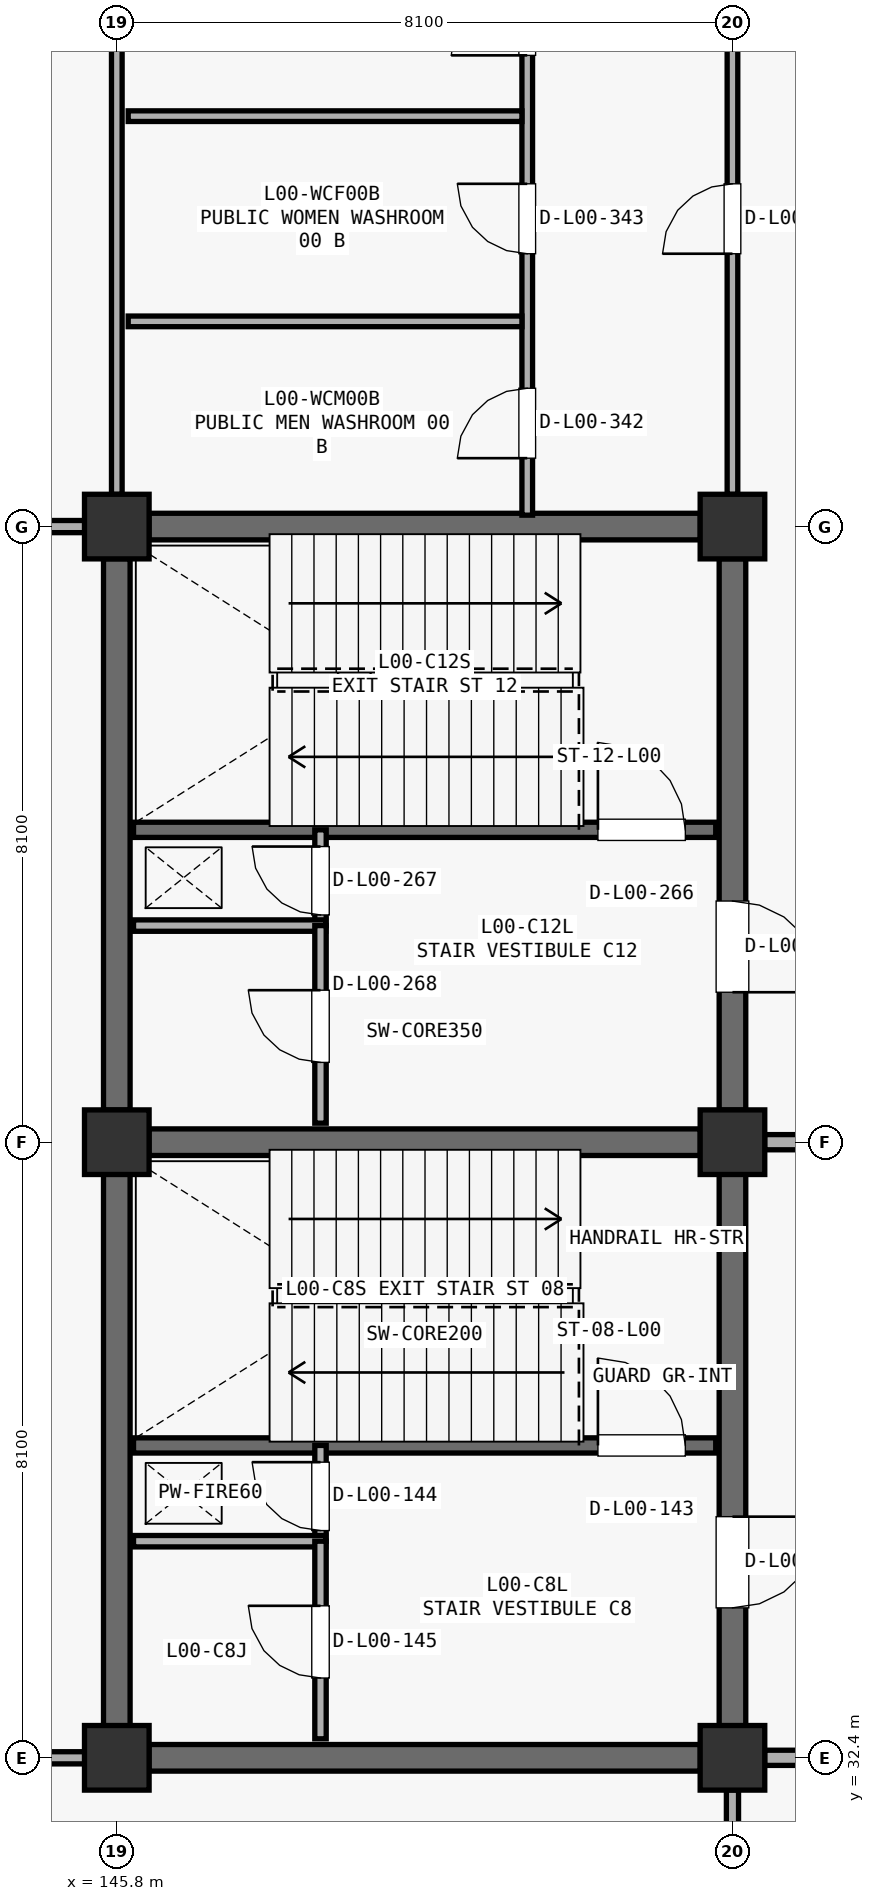
"""IFC4 building model, lengths in metres.
Left out: names, types, materials, properties, quantities, classifications, styles, units other than length and angle.
Written with IfcOpenShell. Run it as: python <this file> out.ifc"""

import sys

from ifc_helpers import new_model, si_unit, direction, frame, frame_2d, origin, origin_2d, place, context, subcontext, project, spatial, rectangle, extrude, element, fill, save


model = new_model("IFC4")
c1 = context("Model", 3, precision=1e-05, world=origin(), true_north=direction((0.0, 1.0)))
c2 = subcontext(c1, "Body", "Model", "MODEL_VIEW")
j1 = project(units=[si_unit("LENGTHUNIT", "METRE"), si_unit("PLANEANGLEUNIT", "RADIAN")], contexts=[c1])
p1 = place(None, origin())
s1 = spatial("IfcSite", under=j1, at=p1, CompositionType="ELEMENT")
p2 = place(p1, origin())
s2 = spatial("IfcBuilding", under=s1, at=p2, CompositionType="ELEMENT")
p3 = place(p2, origin())
s3 = spatial("IfcBuildingStorey", under=s2, at=p3, CompositionType="ELEMENT", Elevation=0.0)
for number, where, z_axis, x_axis in (
    (1, (145.8, 32.4, 0.0), (0.0, 0.0, 1.0), (1.0, 0.0, 0.0)),
    (2, (145.8, 40.5, 0.0), (0.0, 0.0, 1.0), (1.0, 0.0, 0.0)),
    (3, (145.8, 48.6, 0.0), (0.0, 0.0, 1.0), (1.0, 0.0, 0.0)),
    (4, (153.9, 32.4, 0.0), (0.0, 0.0, 1.0), (1.0, 0.0, 0.0)),
    (5, (153.9, 40.5, 0.0), (0.0, 0.0, 1.0), (1.0, 0.0, 0.0)),
    (6, (153.9, 48.6, 0.0), (0.0, 0.0, 1.0), (1.0, 0.0, 0.0)),
):
    element("IfcColumn", number, at=place(p3, frame(where, z_axis=z_axis, x_axis=x_axis)), inside=s3, PredefinedType="COLUMN", context=c2, shape_type="SweptSolid", body=[
        extrude(rectangle(XDim=0.85, YDim=0.85, at=origin_2d()), origin(), (0.0, 0.0, 1.0), 5.1),
    ])
p4 = place(p3, frame((146.223, 40.5, 0.0), z_axis=(0.0, 0.0, 1.0), x_axis=(1.0, 0.0, 0.0)))
e7 = element("IfcWall", 7, at=p4, inside=s3, PredefinedType="SHEAR", context=c2, shape_type="SweptSolid", body=[
    extrude(rectangle(XDim=7.254, YDim=0.35, at=frame_2d((3.627, 0.0))), origin(), (0.0, 0.0, 1.0), 4.822),
])
p5 = place(p3, frame((145.8, 32.823, 0.0), z_axis=(0.0, 0.0, 1.0), x_axis=(0.0, 1.0, 0.0)))
e8 = element("IfcWall", 8, at=p5, inside=s3, PredefinedType="SHEAR", context=c2, shape_type="SweptSolid", body=[
    extrude(rectangle(XDim=7.254, YDim=0.35, at=frame_2d((3.627, 0.0))), origin(), (0.0, 0.0, 1.0), 4.822),
])
p6 = place(p3, frame((153.9, 32.823, 0.0), z_axis=(0.0, 0.0, 1.0), x_axis=(0.0, 1.0, 0.0)))
e9 = element("IfcWall", 9, at=p6, inside=s3, PredefinedType="SHEAR", context=c2, shape_type="SweptSolid", body=[
    extrude(rectangle(XDim=7.254, YDim=0.35, at=frame_2d((3.627, 0.0))), origin(), (0.0, 0.0, 1.0), 4.822),
])
p7 = place(p6, frame((2.75, 0.0, 0.0), z_axis=(0.0, 0.0, 1.0), x_axis=(-1.0, 0.0, 0.0)))
e10 = element("IfcOpeningElement", 10, at=p7, cuts=e9, PredefinedType="OPENING", context=c2, shape_type="SweptSolid", body=[
    extrude(rectangle(XDim=1.2, YDim=2.2, at=frame_2d((0.6, 1.1))), frame((0.0, 0.185, 0.0), z_axis=(0.0, -1.0, 0.0), x_axis=(1.0, 0.0, 0.0)), (0.0, 0.0, 1.0), 0.37),
])
p8 = place(p3, frame((146.223, 32.4, 0.0), z_axis=(0.0, 0.0, 1.0), x_axis=(1.0, 0.0, 0.0)))
e11 = element("IfcWall", 11, at=p8, inside=s3, PredefinedType="SHEAR", context=c2, shape_type="SweptSolid", body=[
    extrude(rectangle(XDim=7.254, YDim=0.35, at=frame_2d((3.627, 0.0))), origin(), (0.0, 0.0, 1.0), 4.822),
])
p9 = place(p3, frame((146.02, 36.51, 0.0), z_axis=(0.0, 0.0, 1.0), x_axis=(1.0, 0.0, 0.0)))
e12 = element("IfcWall", 12, at=p9, inside=s3, PredefinedType="SHEAR", context=c2, shape_type="SweptSolid", body=[
    extrude(rectangle(XDim=7.66, YDim=0.2, at=frame_2d((3.83, 0.0))), origin(), (0.0, 0.0, 1.0), 4.822),
])
p10 = place(p9, frame((6.11, 0.0, 0.0)))
e13 = element("IfcOpeningElement", 13, at=p10, cuts=e12, PredefinedType="OPENING", context=c2, shape_type="SweptSolid", body=[
    extrude(rectangle(XDim=1.15, YDim=2.2, at=frame_2d((0.575, 1.1))), frame((0.0, 0.11, 0.0), z_axis=(0.0, -1.0, 0.0), x_axis=(1.0, 0.0, 0.0)), (0.0, 0.0, 1.0), 0.22),
])
p11 = place(p3, frame((148.48, 35.25, 0.0), z_axis=(0.0, 0.0, 1.0), x_axis=(0.0, 1.0, 0.0)))
e14 = element("IfcWall", 14, at=p11, inside=s3, PredefinedType="PARTITIONING", context=c2, shape_type="SweptSolid", body=[
    extrude(rectangle(XDim=1.26, YDim=0.15, at=frame_2d((0.63, 0.0))), origin(), (0.0, 0.0, 1.0), 4.822),
])
p12 = place(p11, frame((0.14, 0.0, 0.0)))
e15 = element("IfcOpeningElement", 15, at=p12, cuts=e14, PredefinedType="OPENING", context=c2, shape_type="SweptSolid", body=[
    extrude(rectangle(XDim=0.9, YDim=2.15, at=frame_2d((0.45, 1.075))), frame((0.0, 0.085, 0.0), z_axis=(0.0, -1.0, 0.0), x_axis=(1.0, 0.0, 0.0)), (0.0, 0.0, 1.0), 0.17),
])
p13 = place(p3, frame((146.02, 35.25, 0.0), z_axis=(0.0, 0.0, 1.0), x_axis=(1.0, 0.0, 0.0)))
e16 = element("IfcWall", 16, at=p13, inside=s3, PredefinedType="PARTITIONING", context=c2, shape_type="SweptSolid", body=[
    extrude(rectangle(XDim=2.53, YDim=0.15, at=frame_2d((1.265, 0.0))), origin(), (0.0, 0.0, 1.0), 4.822),
])
p14 = place(p3, frame((148.48, 32.65, 0.0), z_axis=(0.0, 0.0, 1.0), x_axis=(0.0, 1.0, 0.0)))
e17 = element("IfcWall", 17, at=p14, inside=s3, PredefinedType="PARTITIONING", context=c2, shape_type="SweptSolid", body=[
    extrude(rectangle(XDim=2.6, YDim=0.15, at=frame_2d((1.3, 0.0))), origin(), (0.0, 0.0, 1.0), 4.822),
])
p15 = place(p14, frame((0.8, 0.0, 0.0)))
e18 = element("IfcOpeningElement", 18, at=p15, cuts=e17, PredefinedType="OPENING", context=c2, shape_type="SweptSolid", body=[
    extrude(rectangle(XDim=0.95, YDim=2.15, at=frame_2d((0.475, 1.075))), frame((0.0, 0.085, 0.0), z_axis=(0.0, -1.0, 0.0), x_axis=(1.0, 0.0, 0.0)), (0.0, 0.0, 1.0), 0.17),
])
p16 = place(p3, frame((146.223, 48.6, 0.0), z_axis=(0.0, 0.0, 1.0), x_axis=(1.0, 0.0, 0.0)))
e19 = element("IfcWall", 19, at=p16, inside=s3, PredefinedType="SHEAR", context=c2, shape_type="SweptSolid", body=[
    extrude(rectangle(XDim=7.254, YDim=0.35, at=frame_2d((3.627, 0.0))), origin(), (0.0, 0.0, 1.0), 4.822),
])
p17 = place(p3, frame((145.8, 40.923, 0.0), z_axis=(0.0, 0.0, 1.0), x_axis=(0.0, 1.0, 0.0)))
e20 = element("IfcWall", 20, at=p17, inside=s3, PredefinedType="SHEAR", context=c2, shape_type="SweptSolid", body=[
    extrude(rectangle(XDim=7.254, YDim=0.35, at=frame_2d((3.627, 0.0))), origin(), (0.0, 0.0, 1.0), 4.822),
])
p18 = place(p3, frame((153.9, 40.923, 0.0), z_axis=(0.0, 0.0, 1.0), x_axis=(0.0, 1.0, 0.0)))
e21 = element("IfcWall", 21, at=p18, inside=s3, PredefinedType="SHEAR", context=c2, shape_type="SweptSolid", body=[
    extrude(rectangle(XDim=7.254, YDim=0.35, at=frame_2d((3.627, 0.0))), origin(), (0.0, 0.0, 1.0), 4.822),
])
p19 = place(p18, frame((2.75, 0.0, 0.0), z_axis=(0.0, 0.0, 1.0), x_axis=(-1.0, 0.0, 0.0)))
e22 = element("IfcOpeningElement", 22, at=p19, cuts=e21, PredefinedType="OPENING", context=c2, shape_type="SweptSolid", body=[
    extrude(rectangle(XDim=1.2, YDim=2.2, at=frame_2d((0.6, 1.1))), frame((0.0, 0.185, 0.0), z_axis=(0.0, -1.0, 0.0), x_axis=(1.0, 0.0, 0.0)), (0.0, 0.0, 1.0), 0.37),
])
p20 = place(p3, frame((146.02, 44.61, 0.0), z_axis=(0.0, 0.0, 1.0), x_axis=(1.0, 0.0, 0.0)))
e23 = element("IfcWall", 23, at=p20, inside=s3, PredefinedType="SHEAR", context=c2, shape_type="SweptSolid", body=[
    extrude(rectangle(XDim=7.66, YDim=0.2, at=frame_2d((3.83, 0.0))), origin(), (0.0, 0.0, 1.0), 4.822),
])
p21 = place(p20, frame((6.11, 0.0, 0.0)))
e24 = element("IfcOpeningElement", 24, at=p21, cuts=e23, PredefinedType="OPENING", context=c2, shape_type="SweptSolid", body=[
    extrude(rectangle(XDim=1.15, YDim=2.2, at=frame_2d((0.575, 1.1))), frame((0.0, 0.11, 0.0), z_axis=(0.0, -1.0, 0.0), x_axis=(1.0, 0.0, 0.0)), (0.0, 0.0, 1.0), 0.22),
])
p22 = place(p3, frame((148.48, 43.35, 0.0), z_axis=(0.0, 0.0, 1.0), x_axis=(0.0, 1.0, 0.0)))
e25 = element("IfcWall", 25, at=p22, inside=s3, PredefinedType="PARTITIONING", context=c2, shape_type="SweptSolid", body=[
    extrude(rectangle(XDim=1.26, YDim=0.15, at=frame_2d((0.63, 0.0))), origin(), (0.0, 0.0, 1.0), 4.822),
])
p23 = place(p22, frame((0.14, 0.0, 0.0)))
e26 = element("IfcOpeningElement", 26, at=p23, cuts=e25, PredefinedType="OPENING", context=c2, shape_type="SweptSolid", body=[
    extrude(rectangle(XDim=0.9, YDim=2.15, at=frame_2d((0.45, 1.075))), frame((0.0, 0.085, 0.0), z_axis=(0.0, -1.0, 0.0), x_axis=(1.0, 0.0, 0.0)), (0.0, 0.0, 1.0), 0.17),
])
p24 = place(p3, frame((146.02, 43.35, 0.0), z_axis=(0.0, 0.0, 1.0), x_axis=(1.0, 0.0, 0.0)))
e27 = element("IfcWall", 27, at=p24, inside=s3, PredefinedType="PARTITIONING", context=c2, shape_type="SweptSolid", body=[
    extrude(rectangle(XDim=2.53, YDim=0.15, at=frame_2d((1.265, 0.0))), origin(), (0.0, 0.0, 1.0), 4.822),
])
p25 = place(p3, frame((148.48, 40.75, 0.0), z_axis=(0.0, 0.0, 1.0), x_axis=(0.0, 1.0, 0.0)))
e28 = element("IfcWall", 28, at=p25, inside=s3, PredefinedType="PARTITIONING", context=c2, shape_type="SweptSolid", body=[
    extrude(rectangle(XDim=2.6, YDim=0.15, at=frame_2d((1.3, 0.0))), origin(), (0.0, 0.0, 1.0), 4.822),
])
p26 = place(p25, frame((0.8, 0.0, 0.0)))
e29 = element("IfcOpeningElement", 29, at=p26, cuts=e28, PredefinedType="OPENING", context=c2, shape_type="SweptSolid", body=[
    extrude(rectangle(XDim=0.95, YDim=2.15, at=frame_2d((0.475, 1.075))), frame((0.0, 0.085, 0.0), z_axis=(0.0, -1.0, 0.0), x_axis=(1.0, 0.0, 0.0)), (0.0, 0.0, 1.0), 0.17),
])
p27 = place(p3, frame((145.8, 49.023, 0.0), z_axis=(0.0, 0.0, 1.0), x_axis=(0.0, 1.0, 0.0)))
e30 = element("IfcWall", 30, at=p27, inside=s3, PredefinedType="PARTITIONING", context=c2, shape_type="SweptSolid", body=[
    extrude(rectangle(XDim=7.254, YDim=0.14, at=frame_2d((3.627, 0.0))), origin(), (0.0, 0.0, 1.0), 3.97),
])
p28 = place(p3, frame((153.9, 49.023, 0.0), z_axis=(0.0, 0.0, 1.0), x_axis=(0.0, 1.0, 0.0)))
e31 = element("IfcWall", 31, at=p28, inside=s3, PredefinedType="PARTITIONING", context=c2, shape_type="SweptSolid", body=[
    extrude(rectangle(XDim=7.254, YDim=0.14, at=frame_2d((3.627, 0.0))), origin(), (0.0, 0.0, 1.0), 4.07),
])
p29 = place(p28, frame((3.167, 0.0, 0.0)))
e32 = element("IfcOpeningElement", 32, at=p29, cuts=e31, PredefinedType="OPENING", context=c2, shape_type="SweptSolid", body=[
    extrude(rectangle(XDim=0.92, YDim=2.15, at=frame_2d((0.46, 1.075))), frame((0.0, 0.08, 0.0), z_axis=(0.0, -1.0, 0.0), x_axis=(1.0, 0.0, 0.0)), (0.0, 0.0, 1.0), 0.16),
])
p30 = place(p3, frame((151.2, 48.75, 0.0), z_axis=(0.0, 0.0, 1.0), x_axis=(0.0, 1.0, 0.0)))
e33 = element("IfcWall", 33, at=p30, inside=s3, PredefinedType="PARTITIONING", context=c2, shape_type="SweptSolid", body=[
    extrude(rectangle(XDim=7.8, YDim=0.14, at=frame_2d((3.9, 0.0))), origin(), (0.0, 0.0, 1.0), 4.822),
])
p31 = place(p30, frame((0.75, 0.0, 0.0)))
e34 = element("IfcOpeningElement", 34, at=p31, cuts=e33, PredefinedType="OPENING", context=c2, shape_type="SweptSolid", body=[
    extrude(rectangle(XDim=0.92, YDim=2.15, at=frame_2d((0.46, 1.075))), frame((0.0, 0.08, 0.0), z_axis=(0.0, -1.0, 0.0), x_axis=(1.0, 0.0, 0.0)), (0.0, 0.0, 1.0), 0.16),
])
p32 = place(p30, frame((3.44, 0.0, 0.0)))
e35 = element("IfcOpeningElement", 35, at=p32, cuts=e33, PredefinedType="OPENING", context=c2, shape_type="SweptSolid", body=[
    extrude(rectangle(XDim=0.92, YDim=2.15, at=frame_2d((0.46, 1.075))), frame((0.0, 0.08, 0.0), z_axis=(0.0, -1.0, 0.0), x_axis=(1.0, 0.0, 0.0)), (0.0, 0.0, 1.0), 0.16),
])
p33 = place(p30, frame((6.05, 0.0, 0.0)))
e36 = element("IfcOpeningElement", 36, at=p33, cuts=e33, PredefinedType="OPENING", context=c2, shape_type="SweptSolid", body=[
    extrude(rectangle(XDim=1.0, YDim=2.15, at=frame_2d((0.5, 1.075))), frame((0.0, 0.08, 0.0), z_axis=(0.0, -1.0, 0.0), x_axis=(1.0, 0.0, 0.0)), (0.0, 0.0, 1.0), 0.16),
])
for number, where, z_axis, x_axis in (
    (37, (145.95, 51.3, 0.0), (0.0, 0.0, 1.0), (1.0, 0.0, 0.0)),
    (38, (145.95, 54.0, 0.0), (0.0, 0.0, 1.0), (1.0, 0.0, 0.0)),
):
    element("IfcWall", number, at=place(p3, frame(where, z_axis=z_axis, x_axis=x_axis)), inside=s3, PredefinedType="PARTITIONING", context=c2, shape_type="SweptSolid", body=[
        extrude(rectangle(XDim=5.18, YDim=0.14, at=frame_2d((2.59, 0.0))), origin(), (0.0, 0.0, 1.0), 4.822),
    ])
p34 = place(p3, frame((153.9, 24.723, 0.0), z_axis=(0.0, 0.0, 1.0), x_axis=(0.0, 1.0, 0.0)))
e39 = element("IfcWall", 39, at=p34, inside=s3, PredefinedType="PARTITIONING", context=c2, shape_type="SweptSolid", body=[
    extrude(rectangle(XDim=7.254, YDim=0.16, at=frame_2d((3.627, 0.0))), origin(), (0.0, 0.0, 1.0), 4.222),
])
p35 = place(p3, frame((138.123, 32.4, 0.0), z_axis=(0.0, 0.0, 1.0), x_axis=(1.0, 0.0, 0.0)))
e40 = element("IfcWall", 40, at=p35, inside=s3, PredefinedType="PARTITIONING", context=c2, shape_type="SweptSolid", body=[
    extrude(rectangle(XDim=7.254, YDim=0.16, at=frame_2d((3.627, 0.0))), origin(), (0.0, 0.0, 1.0), 4.222),
])
p36 = place(p3, frame((138.123, 48.6, 0.0), z_axis=(0.0, 0.0, 1.0), x_axis=(1.0, 0.0, 0.0)))
e41 = element("IfcWall", 41, at=p36, inside=s3, PredefinedType="PARTITIONING", context=c2, shape_type="SweptSolid", body=[
    extrude(rectangle(XDim=7.254, YDim=0.16, at=frame_2d((3.627, 0.0))), origin(), (0.0, 0.0, 1.0), 3.872),
])
p37 = place(p3, frame((154.323, 32.4, 0.0), z_axis=(0.0, 0.0, 1.0), x_axis=(1.0, 0.0, 0.0)))
e42 = element("IfcWall", 42, at=p37, inside=s3, PredefinedType="PARTITIONING", context=c2, shape_type="SweptSolid", body=[
    extrude(rectangle(XDim=7.254, YDim=0.2, at=frame_2d((3.627, 0.0))), origin(), (0.0, 0.0, 1.0), 3.872),
])
p38 = place(p37, frame((2.727, 0.0, 0.0)))
e43 = element("IfcOpeningElement", 43, at=p38, cuts=e42, PredefinedType="OPENING", context=c2, shape_type="SweptSolid", body=[
    extrude(rectangle(XDim=1.8, YDim=2.2, at=frame_2d((0.9, 1.1))), frame((0.0, 0.11, 0.0), z_axis=(0.0, -1.0, 0.0), x_axis=(1.0, 0.0, 0.0)), (0.0, 0.0, 1.0), 0.22),
])
p39 = place(p3, frame((154.323, 40.5, 0.0), z_axis=(0.0, 0.0, 1.0), x_axis=(1.0, 0.0, 0.0)))
e44 = element("IfcWall", 44, at=p39, inside=s3, PredefinedType="PARTITIONING", context=c2, shape_type="SweptSolid", body=[
    extrude(rectangle(XDim=7.254, YDim=0.2, at=frame_2d((3.627, 0.0))), origin(), (0.0, 0.0, 1.0), 4.072),
])
p40 = place(p39, frame((2.727, 0.0, 0.0)))
e45 = element("IfcOpeningElement", 45, at=p40, cuts=e44, PredefinedType="OPENING", context=c2, shape_type="SweptSolid", body=[
    extrude(rectangle(XDim=1.8, YDim=2.2, at=frame_2d((0.9, 1.1))), frame((0.0, 0.11, 0.0), z_axis=(0.0, -1.0, 0.0), x_axis=(1.0, 0.0, 0.0)), (0.0, 0.0, 1.0), 0.22),
])
p41 = place(p7, origin())
e46 = element("IfcDoor", 46, at=p41, inside=s3, OperationType="SINGLE_SWING_RIGHT", PredefinedType="DOOR", context=c2, shape_type="SweptSolid", body=[
    extrude(rectangle(XDim=1.2, YDim=2.2, at=frame_2d((0.6, 1.1))), frame((0.0, 0.025, 0.0), z_axis=(0.0, -1.0, 0.0), x_axis=(1.0, 0.0, 0.0)), (0.0, 0.0, 1.0), 0.05),
])
fill(e10, e46)
p42 = place(p10, origin())
e47 = element("IfcDoor", 47, at=p42, inside=s3, OperationType="SINGLE_SWING_LEFT", PredefinedType="DOOR", context=c2, shape_type="SweptSolid", body=[
    extrude(rectangle(XDim=1.15, YDim=2.2, at=frame_2d((0.575, 1.1))), frame((0.0, 0.025, 0.0), z_axis=(0.0, -1.0, 0.0), x_axis=(1.0, 0.0, 0.0)), (0.0, 0.0, 1.0), 0.05),
])
fill(e13, e47)
p43 = place(p12, origin())
e48 = element("IfcDoor", 48, at=p43, inside=s3, OperationType="SINGLE_SWING_RIGHT", PredefinedType="DOOR", context=c2, shape_type="SweptSolid", body=[
    extrude(rectangle(XDim=0.9, YDim=2.15, at=frame_2d((0.45, 1.075))), frame((0.0, 0.025, 0.0), z_axis=(0.0, -1.0, 0.0), x_axis=(1.0, 0.0, 0.0)), (0.0, 0.0, 1.0), 0.05),
])
fill(e15, e48)
p44 = place(p15, origin())
e49 = element("IfcDoor", 49, at=p44, inside=s3, OperationType="SINGLE_SWING_RIGHT", PredefinedType="DOOR", context=c2, shape_type="SweptSolid", body=[
    extrude(rectangle(XDim=0.95, YDim=2.15, at=frame_2d((0.475, 1.075))), frame((0.0, 0.025, 0.0), z_axis=(0.0, -1.0, 0.0), x_axis=(1.0, 0.0, 0.0)), (0.0, 0.0, 1.0), 0.05),
])
fill(e18, e49)
p45 = place(p19, origin())
e50 = element("IfcDoor", 50, at=p45, inside=s3, OperationType="SINGLE_SWING_LEFT", PredefinedType="DOOR", context=c2, shape_type="SweptSolid", body=[
    extrude(rectangle(XDim=1.2, YDim=2.2, at=frame_2d((0.6, 1.1))), frame((0.0, 0.025, 0.0), z_axis=(0.0, -1.0, 0.0), x_axis=(1.0, 0.0, 0.0)), (0.0, 0.0, 1.0), 0.05),
])
fill(e22, e50)
p46 = place(p21, origin())
e51 = element("IfcDoor", 51, at=p46, inside=s3, OperationType="SINGLE_SWING_LEFT", PredefinedType="DOOR", context=c2, shape_type="SweptSolid", body=[
    extrude(rectangle(XDim=1.15, YDim=2.2, at=frame_2d((0.575, 1.1))), frame((0.0, 0.025, 0.0), z_axis=(0.0, -1.0, 0.0), x_axis=(1.0, 0.0, 0.0)), (0.0, 0.0, 1.0), 0.05),
])
fill(e24, e51)
p47 = place(p23, origin())
e52 = element("IfcDoor", 52, at=p47, inside=s3, OperationType="SINGLE_SWING_RIGHT", PredefinedType="DOOR", context=c2, shape_type="SweptSolid", body=[
    extrude(rectangle(XDim=0.9, YDim=2.15, at=frame_2d((0.45, 1.075))), frame((0.0, 0.025, 0.0), z_axis=(0.0, -1.0, 0.0), x_axis=(1.0, 0.0, 0.0)), (0.0, 0.0, 1.0), 0.05),
])
fill(e26, e52)
p48 = place(p26, origin())
e53 = element("IfcDoor", 53, at=p48, inside=s3, OperationType="SINGLE_SWING_RIGHT", PredefinedType="DOOR", context=c2, shape_type="SweptSolid", body=[
    extrude(rectangle(XDim=0.95, YDim=2.15, at=frame_2d((0.475, 1.075))), frame((0.0, 0.025, 0.0), z_axis=(0.0, -1.0, 0.0), x_axis=(1.0, 0.0, 0.0)), (0.0, 0.0, 1.0), 0.05),
])
fill(e29, e53)
p49 = place(p29, origin())
e54 = element("IfcDoor", 54, at=p49, inside=s3, OperationType="SINGLE_SWING_LEFT", PredefinedType="DOOR", context=c2, shape_type="SweptSolid", body=[
    extrude(rectangle(XDim=0.92, YDim=2.15, at=frame_2d((0.46, 1.075))), frame((0.0, 0.025, 0.0), z_axis=(0.0, -1.0, 0.0), x_axis=(1.0, 0.0, 0.0)), (0.0, 0.0, 1.0), 0.05),
])
fill(e32, e54)
p50 = place(p31, origin())
e55 = element("IfcDoor", 55, at=p50, inside=s3, OperationType="SINGLE_SWING_LEFT", PredefinedType="DOOR", context=c2, shape_type="SweptSolid", body=[
    extrude(rectangle(XDim=0.92, YDim=2.15, at=frame_2d((0.46, 1.075))), frame((0.0, 0.025, 0.0), z_axis=(0.0, -1.0, 0.0), x_axis=(1.0, 0.0, 0.0)), (0.0, 0.0, 1.0), 0.05),
])
fill(e34, e55)
p51 = place(p32, origin())
e56 = element("IfcDoor", 56, at=p51, inside=s3, OperationType="SINGLE_SWING_RIGHT", PredefinedType="DOOR", context=c2, shape_type="SweptSolid", body=[
    extrude(rectangle(XDim=0.92, YDim=2.15, at=frame_2d((0.46, 1.075))), frame((0.0, 0.025, 0.0), z_axis=(0.0, -1.0, 0.0), x_axis=(1.0, 0.0, 0.0)), (0.0, 0.0, 1.0), 0.05),
])
fill(e35, e56)
p52 = place(p33, origin())
e57 = element("IfcDoor", 57, at=p52, inside=s3, OperationType="SINGLE_SWING_LEFT", PredefinedType="DOOR", context=c2, shape_type="SweptSolid", body=[
    extrude(rectangle(XDim=1.0, YDim=2.15, at=frame_2d((0.5, 1.075))), frame((0.0, 0.025, 0.0), z_axis=(0.0, -1.0, 0.0), x_axis=(1.0, 0.0, 0.0)), (0.0, 0.0, 1.0), 0.05),
])
fill(e36, e57)
save(model, sys.argv[1])
